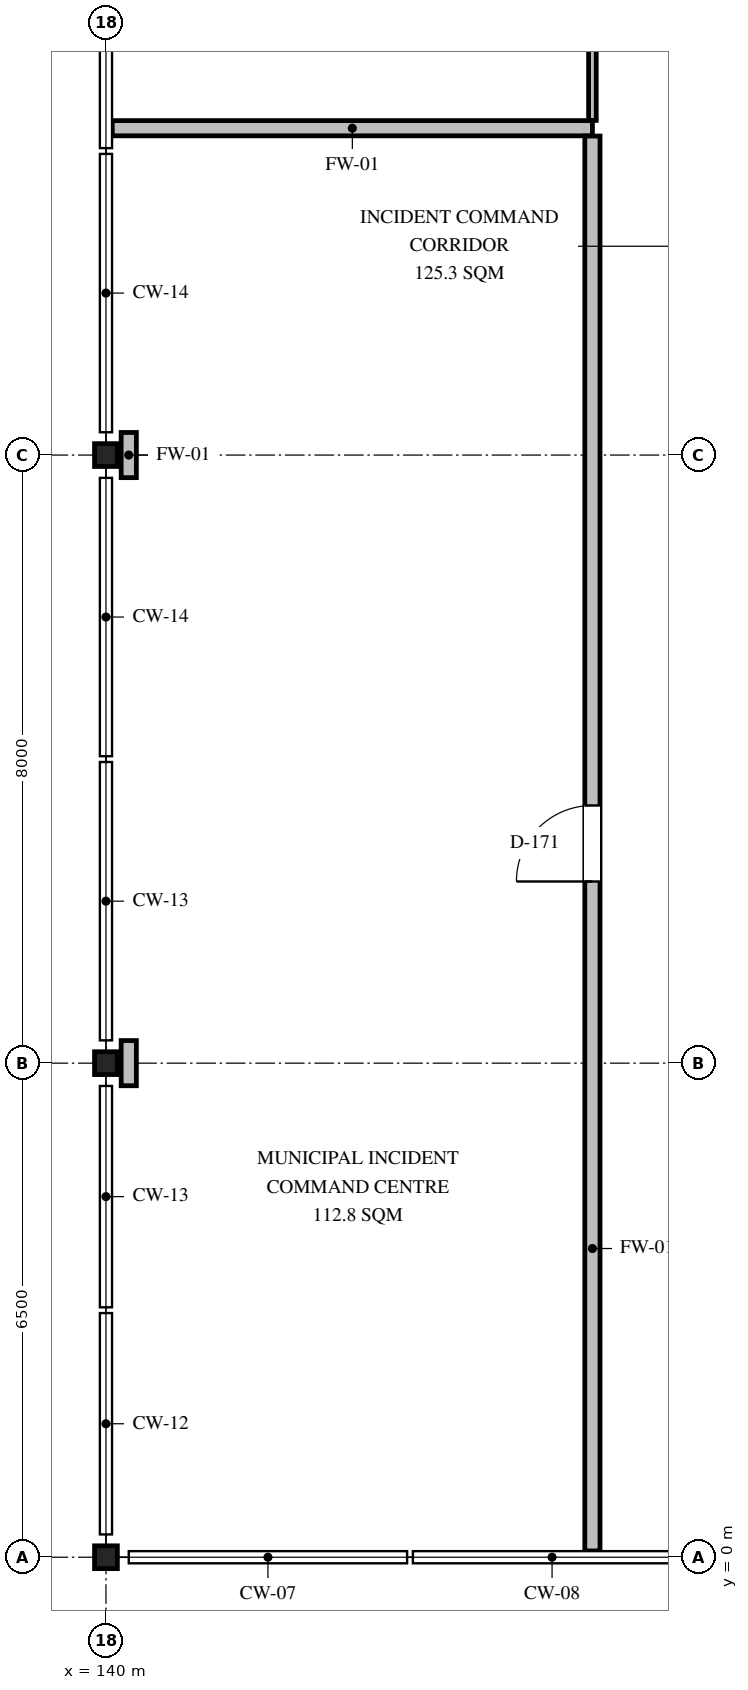
"""IFC4 building model, lengths in metres.
Left out: names, types, materials, properties, quantities, classifications, styles, units other than length and angle.
Written with IfcOpenShell. Run it as: python <this file> out.ifc"""

import sys

from ifc_helpers import new_model, si_unit, direction, frame, frame_2d, origin, origin_2d, place, context, subcontext, project, spatial, rectangle, i_section, extrude, element, fill, save


model = new_model("IFC4")
c1 = context("Model", 3, precision=1e-05, world=origin(), true_north=direction((0.0, 1.0)))
c2 = subcontext(c1, "Body", "Model", "MODEL_VIEW")
j1 = project(units=[si_unit("LENGTHUNIT", "METRE"), si_unit("PLANEANGLEUNIT", "RADIAN")], contexts=[c1])
p1 = place(None, origin())
s1 = spatial("IfcSite", under=j1, at=p1, CompositionType="ELEMENT")
p2 = place(p1, origin())
s2 = spatial("IfcBuilding", under=s1, at=p2, CompositionType="ELEMENT")
p3 = place(p2, frame((0.0, 0.0, 14.25)))
s3 = spatial("IfcBuildingStorey", under=s2, at=p3, CompositionType="ELEMENT", Elevation=14.25)
for number, where, z_axis, x_axis in (
    (1, (140.0, 0.0, 0.0), (0.0, 0.0, 1.0), (1.0, 0.0, 0.0)),
    (2, (140.0, 6.5, 0.0), (0.0, 0.0, 1.0), (1.0, 0.0, 0.0)),
    (3, (140.0, 14.5, 0.0), (0.0, 0.0, 1.0), (1.0, 0.0, 0.0)),
):
    element("IfcColumn", number, at=place(p3, frame(where, z_axis=z_axis, x_axis=x_axis)), inside=s3, PredefinedType="COLUMN", context=c2, shape_type="SweptSolid", body=[
        extrude(i_section(OverallWidth=0.3, OverallDepth=0.3, WebThickness=0.01, FlangeThickness=0.015, FilletRadius=0.018, at=origin_2d()), origin(), (0.0, 0.0, 1.0), 4.2),
    ])
p4 = place(p3, frame((140.083, 18.8, 0.0), z_axis=(0.0, 0.0, 1.0), x_axis=(1.0, 0.0, 0.0)))
e4 = element("IfcWall", 4, at=p4, inside=s3, PredefinedType="PARTITIONING", context=c2, shape_type="SweptSolid", body=[
    extrude(rectangle(XDim=6.317, YDim=0.2, at=frame_2d((3.158, 0.0))), origin(), (0.0, 0.0, 1.0), 3.98),
])
for number, where, z_axis, x_axis in (
    (5, (140.3, 6.203, 0.0), (0.0, 0.0, 1.0), (0.0, 1.0, 0.0)),
    (6, (140.3, 14.203, 0.0), (0.0, 0.0, 1.0), (0.0, 1.0, 0.0)),
):
    element("IfcWall", number, at=place(p3, frame(where, z_axis=z_axis, x_axis=x_axis)), inside=s3, PredefinedType="PARTITIONING", context=c2, shape_type="SweptSolid", body=[
        extrude(rectangle(XDim=0.594, YDim=0.2, at=frame_2d((0.297, 0.0))), origin(), (0.0, 0.0, 1.0), 3.98),
    ])
p5 = place(p3, frame((146.4, 0.083, 0.0), z_axis=(0.0, 0.0, 1.0), x_axis=(0.0, 1.0, 0.0)))
e7 = element("IfcWall", 7, at=p5, inside=s3, PredefinedType="PARTITIONING", context=c2, shape_type="SweptSolid", body=[
    extrude(rectangle(XDim=18.614, YDim=0.2, at=frame_2d((9.307, 0.0))), origin(), (0.0, 0.0, 1.0), 3.674),
])
p6 = place(p5, frame((8.807, 0.0, 0.0)))
e8 = element("IfcOpeningElement", 8, at=p6, cuts=e7, PredefinedType="OPENING", context=c2, shape_type="SweptSolid", body=[
    extrude(rectangle(XDim=1.0, YDim=2.1, at=frame_2d((0.5, 1.05))), frame((0.0, 0.11, 0.0), z_axis=(0.0, -1.0, 0.0), x_axis=(1.0, 0.0, 0.0)), (0.0, 0.0, 1.0), 0.22),
])
p7 = place(p3, frame((146.4, 18.903, 0.0), z_axis=(0.0, 0.0, 1.0), x_axis=(0.0, 1.0, 0.0)))
e9 = element("IfcWall", 9, at=p7, inside=s3, PredefinedType="PARTITIONING", context=c2, shape_type="SweptSolid", body=[
    extrude(rectangle(XDim=16.484, YDim=0.1, at=frame_2d((8.242, 0.0))), origin(), (0.0, 0.0, 1.0), 3.574),
])
p8 = place(p7, frame((6.542, 0.0, 0.0)))
e10 = element("IfcOpeningElement", 10, at=p8, cuts=e9, PredefinedType="OPENING", context=c2, shape_type="SweptSolid", body=[
    extrude(rectangle(XDim=1.6, YDim=2.2, at=frame_2d((0.8, 1.1))), frame((0.0, 0.06, 0.0), z_axis=(0.0, -1.0, 0.0), x_axis=(1.0, 0.0, 0.0)), (0.0, 0.0, 1.0), 0.12),
])
p9 = place(p6, origin())
e11 = element("IfcDoor", 11, at=p9, inside=s3, OperationType="SINGLE_SWING_LEFT", PredefinedType="DOOR", context=c2, shape_type="SweptSolid", body=[
    extrude(rectangle(XDim=1.0, YDim=2.1, at=frame_2d((0.5, 1.05))), frame((0.0, 0.025, 0.0), z_axis=(0.0, -1.0, 0.0), x_axis=(1.0, 0.0, 0.0)), (0.0, 0.0, 1.0), 0.05),
])
fill(e8, e11)
save(model, sys.argv[1])
